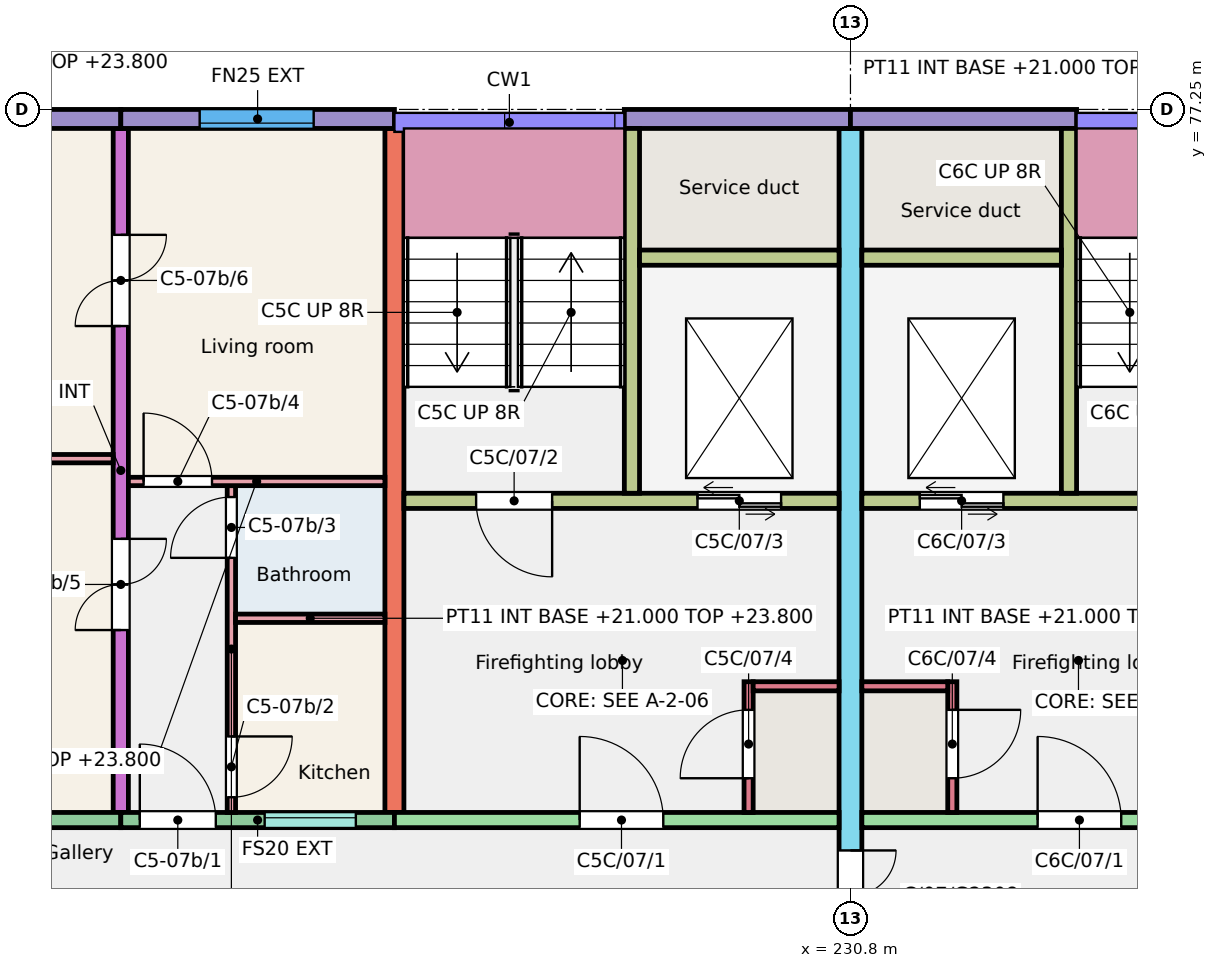
"""IFC4 building model, lengths in metres.
Left out: names, types, materials, properties, quantities, classifications, styles, units other than length and angle.
Written with IfcOpenShell. Run it as: python <this file> out.ifc"""

import sys

from ifc_helpers import new_model, si_unit, direction, frame, frame_2d, origin, place, context, subcontext, project, spatial, rectangle, extrude, element, fill, save


model = new_model("IFC4")
c1 = context("Model", 3, precision=1e-05, world=origin(), true_north=direction((0.0, 1.0)))
c2 = subcontext(c1, "Body", "Model", "MODEL_VIEW")
j1 = project(units=[si_unit("LENGTHUNIT", "METRE"), si_unit("PLANEANGLEUNIT", "RADIAN")], contexts=[c1])
p1 = place(None, origin())
s1 = spatial("IfcSite", under=j1, at=p1, CompositionType="ELEMENT")
p2 = place(p1, origin())
s2 = spatial("IfcBuilding", under=s1, at=p2, CompositionType="ELEMENT")
p3 = place(p2, frame((0.0, 0.0, 21.0)))
s3 = spatial("IfcBuildingStorey", under=s2, at=p3, CompositionType="ELEMENT", Elevation=21.0)
p4 = place(p3, frame((221.2, 68.0, 0.0), z_axis=(0.0, 0.0, 1.0), x_axis=(0.0, 1.0, 0.0)))
e1 = element("IfcWall", 1, at=p4, inside=s3, PredefinedType="SHEAR", context=c2, shape_type="SweptSolid", body=[
    extrude(rectangle(XDim=9.0, YDim=0.2, at=frame_2d((4.5, 0.0))), origin(), (0.0, 0.0, 1.0), 3.0),
])
p5 = place(p4, frame((2.4, 0.0, 0.0)))
e2 = element("IfcOpeningElement", 2, at=p5, cuts=e1, PredefinedType="OPENING", context=c2, shape_type="SweptSolid", body=[
    extrude(rectangle(XDim=1.2, YDim=2.1, at=frame_2d((0.6, 1.05))), frame((0.0, 0.11, 0.0), z_axis=(0.0, -1.0, 0.0), x_axis=(1.0, 0.0, 0.0)), (0.0, 0.0, 1.0), 0.22),
])
p6 = place(p4, frame((6.4, 0.0, 0.0)))
e3 = element("IfcOpeningElement", 3, at=p6, cuts=e1, PredefinedType="OPENING", context=c2, shape_type="SweptSolid", body=[
    extrude(rectangle(XDim=1.2, YDim=2.1, at=frame_2d((0.6, 1.05))), frame((0.0, 0.11, 0.0), z_axis=(0.0, -1.0, 0.0), x_axis=(1.0, 0.0, 0.0)), (0.0, 0.0, 1.0), 0.22),
])
p7 = place(p3, frame((224.8, 68.0, 0.0), z_axis=(0.0, 0.0, 1.0), x_axis=(0.0, 1.0, 0.0)))
e4 = element("IfcWall", 4, at=p7, inside=s3, PredefinedType="SHEAR", context=c2, shape_type="SweptSolid", body=[
    extrude(rectangle(XDim=9.0, YDim=0.25, at=frame_2d((4.5, 0.0))), origin(), (0.0, 0.0, 1.0), 3.0),
])
p8 = place(p3, frame((230.8, 66.0, 0.0), z_axis=(0.0, 0.0, 1.0), x_axis=(0.0, 1.0, 0.0)))
e5 = element("IfcWall", 5, at=p8, inside=s3, PredefinedType="SHEAR", context=c2, shape_type="SweptSolid", body=[
    extrude(rectangle(XDim=11.0, YDim=0.3, at=frame_2d((5.5, 0.0))), origin(), (0.0, 0.0, 1.0), 3.0),
])
p9 = place(p8, frame((0.3, 0.0, 0.0)))
e6 = element("IfcOpeningElement", 6, at=p9, cuts=e5, PredefinedType="OPENING", context=c2, shape_type="SweptSolid", body=[
    extrude(rectangle(XDim=1.2, YDim=2.1, at=frame_2d((0.6, 1.05))), frame((0.0, 0.16, 0.0), z_axis=(0.0, -1.0, 0.0), x_axis=(1.0, 0.0, 0.0)), (0.0, 0.0, 1.0), 0.32),
])
p10 = place(p3, frame((217.6, 77.125, 0.0), z_axis=(0.0, 0.0, 1.0), x_axis=(1.0, 0.0, 0.0)))
e7 = element("IfcWall", 7, at=p10, inside=s3, PredefinedType="SOLIDWALL", context=c2, shape_type="SweptSolid", body=[
    extrude(rectangle(XDim=3.6, YDim=0.25, at=frame_2d((1.8, 0.0))), origin(), (0.0, 0.0, 1.0), 3.0),
])
p11 = place(p10, frame((1.05, 0.0, 0.9)))
e8 = element("IfcOpeningElement", 8, at=p11, cuts=e7, PredefinedType="OPENING", context=c2, shape_type="SweptSolid", body=[
    extrude(rectangle(XDim=1.5, YDim=1.5, at=frame_2d((0.75, 0.75))), frame((0.0, 0.135, 0.0), z_axis=(0.0, -1.0, 0.0), x_axis=(1.0, 0.0, 0.0)), (0.0, 0.0, 1.0), 0.27),
])
p12 = place(p3, frame((217.6, 67.9, 0.0), z_axis=(0.0, 0.0, 1.0), x_axis=(1.0, 0.0, 0.0)))
e9 = element("IfcWall", 9, at=p12, inside=s3, PredefinedType="SOLIDWALL", context=c2, shape_type="SweptSolid", body=[
    extrude(rectangle(XDim=3.6, YDim=0.2, at=frame_2d((1.8, 0.0))), origin(), (0.0, 0.0, 1.0), 3.0),
])
p13 = place(p12, frame((1.05, 0.0, 0.9)))
e10 = element("IfcOpeningElement", 10, at=p13, cuts=e9, PredefinedType="OPENING", context=c2, shape_type="SweptSolid", body=[
    extrude(rectangle(XDim=1.5, YDim=1.5, at=frame_2d((0.75, 0.75))), frame((0.0, 0.11, 0.0), z_axis=(0.0, -1.0, 0.0), x_axis=(1.0, 0.0, 0.0)), (0.0, 0.0, 1.0), 0.22),
])
p14 = place(p3, frame((221.2, 77.125, 0.0), z_axis=(0.0, 0.0, 1.0), x_axis=(1.0, 0.0, 0.0)))
e11 = element("IfcWall", 11, at=p14, inside=s3, PredefinedType="SOLIDWALL", context=c2, shape_type="SweptSolid", body=[
    extrude(rectangle(XDim=3.6, YDim=0.25, at=frame_2d((1.8, 0.0))), origin(), (0.0, 0.0, 1.0), 3.0),
])
p15 = place(p14, frame((1.038, 0.0, 0.9)))
e12 = element("IfcOpeningElement", 12, at=p15, cuts=e11, PredefinedType="OPENING", context=c2, shape_type="SweptSolid", body=[
    extrude(rectangle(XDim=1.5, YDim=1.5, at=frame_2d((0.75, 0.75))), frame((0.0, 0.135, 0.0), z_axis=(0.0, -1.0, 0.0), x_axis=(1.0, 0.0, 0.0)), (0.0, 0.0, 1.0), 0.27),
])
p16 = place(p3, frame((221.2, 67.9, 0.0), z_axis=(0.0, 0.0, 1.0), x_axis=(1.0, 0.0, 0.0)))
e13 = element("IfcWall", 13, at=p16, inside=s3, PredefinedType="SOLIDWALL", context=c2, shape_type="SweptSolid", body=[
    extrude(rectangle(XDim=3.6, YDim=0.2, at=frame_2d((1.8, 0.0))), origin(), (0.0, 0.0, 1.0), 3.0),
])
p17 = place(p16, frame((1.893, 0.0, 1.1)))
e14 = element("IfcOpeningElement", 14, at=p17, cuts=e13, PredefinedType="OPENING", context=c2, shape_type="SweptSolid", body=[
    extrude(rectangle(XDim=1.2, YDim=1.3, at=frame_2d((0.6, 0.65))), frame((0.0, 0.11, 0.0), z_axis=(0.0, -1.0, 0.0), x_axis=(1.0, 0.0, 0.0)), (0.0, 0.0, 1.0), 0.22),
])
p18 = place(p16, frame((0.25, 0.0, 0.0)))
e15 = element("IfcOpeningElement", 15, at=p18, cuts=e13, PredefinedType="OPENING", context=c2, shape_type="SweptSolid", body=[
    extrude(rectangle(XDim=1.0, YDim=2.1, at=frame_2d((0.5, 1.05))), frame((0.0, 0.11, 0.0), z_axis=(0.0, -1.0, 0.0), x_axis=(1.0, 0.0, 0.0)), (0.0, 0.0, 1.0), 0.22),
])
p19 = place(p3, frame((227.825, 77.125, 0.0), z_axis=(0.0, 0.0, 1.0), x_axis=(1.0, 0.0, 0.0)))
e16 = element("IfcWall", 16, at=p19, inside=s3, PredefinedType="SOLIDWALL", context=c2, shape_type="SweptSolid", body=[
    extrude(rectangle(XDim=2.975, YDim=0.25, at=frame_2d((1.488, 0.0))), origin(), (0.0, 0.0, 1.0), 3.0),
])
p20 = place(p3, frame((224.8, 67.9, 0.0), z_axis=(0.0, 0.0, 1.0), x_axis=(1.0, 0.0, 0.0)))
e17 = element("IfcWall", 17, at=p20, inside=s3, PredefinedType="SHEAR", context=c2, shape_type="SweptSolid", body=[
    extrude(rectangle(XDim=5.85, YDim=0.2, at=frame_2d((2.925, 0.0))), origin(), (0.0, 0.0, 1.0), 3.0),
])
p21 = place(p20, frame((2.438, 0.0, 0.0)))
e18 = element("IfcOpeningElement", 18, at=p21, cuts=e17, PredefinedType="OPENING", context=c2, shape_type="SweptSolid", body=[
    extrude(rectangle(XDim=1.1, YDim=2.1, at=frame_2d((0.55, 1.05))), frame((0.0, 0.11, 0.0), z_axis=(0.0, -1.0, 0.0), x_axis=(1.0, 0.0, 0.0)), (0.0, 0.0, 1.0), 0.22),
])
p22 = place(p3, frame((224.925, 72.1, 0.0), z_axis=(0.0, 0.0, 1.0), x_axis=(1.0, 0.0, 0.0)))
e19 = element("IfcWall", 19, at=p22, inside=s3, PredefinedType="SHEAR", context=c2, shape_type="SweptSolid", body=[
    extrude(rectangle(XDim=5.725, YDim=0.2, at=frame_2d((2.862, 0.0))), origin(), (0.0, 0.0, 1.0), 3.0),
])
p23 = place(p22, frame((0.95, 0.0, 0.0)))
e20 = element("IfcOpeningElement", 20, at=p23, cuts=e19, PredefinedType="OPENING", context=c2, shape_type="SweptSolid", body=[
    extrude(rectangle(XDim=1.0, YDim=2.1, at=frame_2d((0.5, 1.05))), frame((0.0, 0.11, 0.0), z_axis=(0.0, -1.0, 0.0), x_axis=(1.0, 0.0, 0.0)), (0.0, 0.0, 1.0), 0.22),
])
p24 = place(p22, frame((3.863, 0.0, 0.0)))
e21 = element("IfcOpeningElement", 21, at=p24, cuts=e19, PredefinedType="OPENING", context=c2, shape_type="SweptSolid", body=[
    extrude(rectangle(XDim=1.1, YDim=2.1, at=frame_2d((0.55, 1.05))), frame((0.0, 0.11, 0.0), z_axis=(0.0, -1.0, 0.0), x_axis=(1.0, 0.0, 0.0)), (0.0, 0.0, 1.0), 0.22),
])
p25 = place(p3, frame((227.925, 72.2, 0.0), z_axis=(0.0, 0.0, 1.0), x_axis=(0.0, 1.0, 0.0)))
e22 = element("IfcWall", 22, at=p25, inside=s3, PredefinedType="SHEAR", context=c2, shape_type="SweptSolid", body=[
    extrude(rectangle(XDim=4.8, YDim=0.2, at=frame_2d((2.4, 0.0))), origin(), (0.0, 0.0, 1.0), 3.0),
])
p26 = place(p3, frame((228.025, 75.3, 0.0), z_axis=(0.0, 0.0, 1.0), x_axis=(1.0, 0.0, 0.0)))
e23 = element("IfcWall", 23, at=p26, inside=s3, PredefinedType="SHEAR", context=c2, shape_type="SweptSolid", body=[
    extrude(rectangle(XDim=2.625, YDim=0.2, at=frame_2d((1.312, 0.0))), origin(), (0.0, 0.0, 1.0), 3.0),
])
p27 = place(p3, frame((229.46, 68.0, 0.0), z_axis=(0.0, 0.0, 1.0), x_axis=(0.0, 1.0, 0.0)))
e24 = element("IfcWall", 24, at=p27, inside=s3, PredefinedType="SHEAR", context=c2, shape_type="SweptSolid", body=[
    extrude(rectangle(XDim=1.72, YDim=0.12, at=frame_2d((0.86, 0.0))), origin(), (0.0, 0.0, 1.0), 3.0),
])
p28 = place(p27, frame((0.45, 0.0, 0.0)))
e25 = element("IfcOpeningElement", 25, at=p28, cuts=e24, PredefinedType="OPENING", context=c2, shape_type="SweptSolid", body=[
    extrude(rectangle(XDim=0.9, YDim=2.1, at=frame_2d((0.45, 1.05))), frame((0.0, 0.07, 0.0), z_axis=(0.0, -1.0, 0.0), x_axis=(1.0, 0.0, 0.0)), (0.0, 0.0, 1.0), 0.14),
])
p29 = place(p3, frame((229.52, 69.66, 0.0), z_axis=(0.0, 0.0, 1.0), x_axis=(1.0, 0.0, 0.0)))
e26 = element("IfcWall", 26, at=p29, inside=s3, PredefinedType="SHEAR", context=c2, shape_type="SweptSolid", body=[
    extrude(rectangle(XDim=1.13, YDim=0.12, at=frame_2d((0.565, 0.0))), origin(), (0.0, 0.0, 1.0), 3.0),
])
p30 = place(p3, frame((230.8, 77.125, 0.0), z_axis=(0.0, 0.0, 1.0), x_axis=(1.0, 0.0, 0.0)))
e27 = element("IfcWall", 27, at=p30, inside=s3, PredefinedType="SOLIDWALL", context=c2, shape_type="SweptSolid", body=[
    extrude(rectangle(XDim=2.975, YDim=0.25, at=frame_2d((1.487, 0.0))), origin(), (0.0, 0.0, 1.0), 3.0),
])
p31 = place(p3, frame((230.95, 67.9, 0.0), z_axis=(0.0, 0.0, 1.0), x_axis=(1.0, 0.0, 0.0)))
e28 = element("IfcWall", 28, at=p31, inside=s3, PredefinedType="SHEAR", context=c2, shape_type="SweptSolid", body=[
    extrude(rectangle(XDim=5.85, YDim=0.2, at=frame_2d((2.925, 0.0))), origin(), (0.0, 0.0, 1.0), 3.0),
])
p32 = place(p31, frame((2.312, 0.0, 0.0)))
e29 = element("IfcOpeningElement", 29, at=p32, cuts=e28, PredefinedType="OPENING", context=c2, shape_type="SweptSolid", body=[
    extrude(rectangle(XDim=1.1, YDim=2.1, at=frame_2d((0.55, 1.05))), frame((0.0, 0.11, 0.0), z_axis=(0.0, -1.0, 0.0), x_axis=(1.0, 0.0, 0.0)), (0.0, 0.0, 1.0), 0.22),
])
p33 = place(p3, frame((230.95, 72.1, 0.0), z_axis=(0.0, 0.0, 1.0), x_axis=(1.0, 0.0, 0.0)))
e30 = element("IfcWall", 30, at=p33, inside=s3, PredefinedType="SHEAR", context=c2, shape_type="SweptSolid", body=[
    extrude(rectangle(XDim=5.725, YDim=0.2, at=frame_2d((2.863, 0.0))), origin(), (0.0, 0.0, 1.0), 3.0),
])
p34 = place(p33, frame((3.775, 0.0, 0.0)))
e31 = element("IfcOpeningElement", 31, at=p34, cuts=e30, PredefinedType="OPENING", context=c2, shape_type="SweptSolid", body=[
    extrude(rectangle(XDim=1.0, YDim=2.1, at=frame_2d((0.5, 1.05))), frame((0.0, 0.11, 0.0), z_axis=(0.0, -1.0, 0.0), x_axis=(1.0, 0.0, 0.0)), (0.0, 0.0, 1.0), 0.22),
])
p35 = place(p33, frame((0.762, 0.0, 0.0)))
e32 = element("IfcOpeningElement", 32, at=p35, cuts=e30, PredefinedType="OPENING", context=c2, shape_type="SweptSolid", body=[
    extrude(rectangle(XDim=1.1, YDim=2.1, at=frame_2d((0.55, 1.05))), frame((0.0, 0.11, 0.0), z_axis=(0.0, -1.0, 0.0), x_axis=(1.0, 0.0, 0.0)), (0.0, 0.0, 1.0), 0.22),
])
p36 = place(p3, frame((233.675, 72.2, 0.0), z_axis=(0.0, 0.0, 1.0), x_axis=(0.0, 1.0, 0.0)))
e33 = element("IfcWall", 33, at=p36, inside=s3, PredefinedType="SHEAR", context=c2, shape_type="SweptSolid", body=[
    extrude(rectangle(XDim=4.8, YDim=0.2, at=frame_2d((2.4, 0.0))), origin(), (0.0, 0.0, 1.0), 3.0),
])
p37 = place(p3, frame((230.95, 75.3, 0.0), z_axis=(0.0, 0.0, 1.0), x_axis=(1.0, 0.0, 0.0)))
e34 = element("IfcWall", 34, at=p37, inside=s3, PredefinedType="SHEAR", context=c2, shape_type="SweptSolid", body=[
    extrude(rectangle(XDim=2.625, YDim=0.2, at=frame_2d((1.312, 0.0))), origin(), (0.0, 0.0, 1.0), 3.0),
])
p38 = place(p3, frame((232.14, 68.0, 0.0), z_axis=(0.0, 0.0, 1.0), x_axis=(0.0, 1.0, 0.0)))
e35 = element("IfcWall", 35, at=p38, inside=s3, PredefinedType="SHEAR", context=c2, shape_type="SweptSolid", body=[
    extrude(rectangle(XDim=1.72, YDim=0.12, at=frame_2d((0.86, 0.0))), origin(), (0.0, 0.0, 1.0), 3.0),
])
p39 = place(p38, frame((0.45, 0.0, 0.0)))
e36 = element("IfcOpeningElement", 36, at=p39, cuts=e35, PredefinedType="OPENING", context=c2, shape_type="SweptSolid", body=[
    extrude(rectangle(XDim=0.9, YDim=2.1, at=frame_2d((0.45, 1.05))), frame((0.0, 0.07, 0.0), z_axis=(0.0, -1.0, 0.0), x_axis=(1.0, 0.0, 0.0)), (0.0, 0.0, 1.0), 0.14),
])
p40 = place(p3, frame((230.95, 69.66, 0.0), z_axis=(0.0, 0.0, 1.0), x_axis=(1.0, 0.0, 0.0)))
e37 = element("IfcWall", 37, at=p40, inside=s3, PredefinedType="SHEAR", context=c2, shape_type="SweptSolid", body=[
    extrude(rectangle(XDim=1.13, YDim=0.12, at=frame_2d((0.565, 0.0))), origin(), (0.0, 0.0, 1.0), 3.0),
])
p41 = place(p3, frame((222.655, 68.0, 0.0), z_axis=(0.0, 0.0, 1.0), x_axis=(0.0, 1.0, 0.0)))
e38 = element("IfcWall", 38, at=p41, inside=s3, PredefinedType="PARTITIONING", context=c2, shape_type="SweptSolid", body=[
    extrude(rectangle(XDim=4.3, YDim=0.11, at=frame_2d((2.15, 0.0))), origin(), (0.0, 0.0, 1.0), 2.8),
])
p42 = place(p41, frame((0.2, 0.0, 0.0)))
e39 = element("IfcOpeningElement", 39, at=p42, cuts=e38, PredefinedType="OPENING", context=c2, shape_type="SweptSolid", body=[
    extrude(rectangle(XDim=0.8, YDim=2.1, at=frame_2d((0.4, 1.05))), frame((0.0, 0.065, 0.0), z_axis=(0.0, -1.0, 0.0), x_axis=(1.0, 0.0, 0.0)), (0.0, 0.0, 1.0), 0.13),
])
p43 = place(p41, frame((3.35, 0.0, 0.0)))
e40 = element("IfcOpeningElement", 40, at=p43, cuts=e38, PredefinedType="OPENING", context=c2, shape_type="SweptSolid", body=[
    extrude(rectangle(XDim=0.8, YDim=2.1, at=frame_2d((0.4, 1.05))), frame((0.0, 0.065, 0.0), z_axis=(0.0, -1.0, 0.0), x_axis=(1.0, 0.0, 0.0)), (0.0, 0.0, 1.0), 0.13),
])
p44 = place(p3, frame((222.71, 70.555, 0.0), z_axis=(0.0, 0.0, 1.0), x_axis=(1.0, 0.0, 0.0)))
e41 = element("IfcWall", 41, at=p44, inside=s3, PredefinedType="PARTITIONING", context=c2, shape_type="SweptSolid", body=[
    extrude(rectangle(XDim=1.965, YDim=0.11, at=frame_2d((0.982, 0.0))), origin(), (0.0, 0.0, 1.0), 2.8),
])
p45 = place(p3, frame((221.3, 72.355, 0.0), z_axis=(0.0, 0.0, 1.0), x_axis=(1.0, 0.0, 0.0)))
e42 = element("IfcWall", 42, at=p45, inside=s3, PredefinedType="PARTITIONING", context=c2, shape_type="SweptSolid", body=[
    extrude(rectangle(XDim=3.375, YDim=0.11, at=frame_2d((1.688, 0.0))), origin(), (0.0, 0.0, 1.0), 2.8),
])
p46 = place(p45, frame((0.2, 0.0, 0.0)))
e43 = element("IfcOpeningElement", 43, at=p46, cuts=e42, PredefinedType="OPENING", context=c2, shape_type="SweptSolid", body=[
    extrude(rectangle(XDim=0.9, YDim=2.1, at=frame_2d((0.45, 1.05))), frame((0.0, 0.065, 0.0), z_axis=(0.0, -1.0, 0.0), x_axis=(1.0, 0.0, 0.0)), (0.0, 0.0, 1.0), 0.13),
])
p47 = place(p3, frame((217.7, 72.655, 0.0), z_axis=(0.0, 0.0, 1.0), x_axis=(1.0, 0.0, 0.0)))
e44 = element("IfcWall", 44, at=p47, inside=s3, PredefinedType="PARTITIONING", context=c2, shape_type="SweptSolid", body=[
    extrude(rectangle(XDim=3.4, YDim=0.11, at=frame_2d((1.7, 0.0))), origin(), (0.0, 0.0, 1.0), 2.8),
])
p48 = place(p17, origin())
e45 = element("IfcWindow", 45, at=p48, inside=s3, PartitioningType="SINGLE_PANEL", PredefinedType="WINDOW", context=c2, shape_type="SweptSolid", body=[
    extrude(rectangle(XDim=1.2, YDim=1.3, at=frame_2d((0.6, 0.65))), frame((0.0, 0.06, 0.0), z_axis=(0.0, -1.0, 0.0), x_axis=(1.0, 0.0, 0.0)), (0.0, 0.0, 1.0), 0.06),
])
fill(e14, e45)
p49 = place(p15, origin())
e46 = element("IfcWindow", 46, at=p49, inside=s3, PartitioningType="SINGLE_PANEL", PredefinedType="WINDOW", context=c2, shape_type="SweptSolid", body=[
    extrude(rectangle(XDim=1.5, YDim=1.5, at=frame_2d((0.75, 0.75))), frame((0.0, -0.025, 0.0), z_axis=(0.0, -1.0, 0.0), x_axis=(1.0, 0.0, 0.0)), (0.0, 0.0, 1.0), 0.06),
])
fill(e12, e46)
p50 = place(p18, origin())
e47 = element("IfcDoor", 47, at=p50, inside=s3, OperationType="SINGLE_SWING_LEFT", PredefinedType="DOOR", context=c2, shape_type="SweptSolid", body=[
    extrude(rectangle(XDim=1.0, YDim=2.1, at=frame_2d((0.5, 1.05))), frame((0.0, 0.025, 0.0), z_axis=(0.0, -1.0, 0.0), x_axis=(1.0, 0.0, 0.0)), (0.0, 0.0, 1.0), 0.05),
])
fill(e15, e47)
p51 = place(p42, origin())
e48 = element("IfcDoor", 48, at=p51, inside=s3, OperationType="SINGLE_SWING_RIGHT", PredefinedType="DOOR", context=c2, shape_type="SweptSolid", body=[
    extrude(rectangle(XDim=0.8, YDim=2.1, at=frame_2d((0.4, 1.05))), frame((0.0, 0.025, 0.0), z_axis=(0.0, -1.0, 0.0), x_axis=(1.0, 0.0, 0.0)), (0.0, 0.0, 1.0), 0.05),
])
fill(e39, e48)
p52 = place(p43, origin())
e49 = element("IfcDoor", 49, at=p52, inside=s3, OperationType="SINGLE_SWING_LEFT", PredefinedType="DOOR", context=c2, shape_type="SweptSolid", body=[
    extrude(rectangle(XDim=0.8, YDim=2.1, at=frame_2d((0.4, 1.05))), frame((0.0, 0.025, 0.0), z_axis=(0.0, -1.0, 0.0), x_axis=(1.0, 0.0, 0.0)), (0.0, 0.0, 1.0), 0.05),
])
fill(e40, e49)
p53 = place(p46, origin())
e50 = element("IfcDoor", 50, at=p53, inside=s3, OperationType="SINGLE_SWING_LEFT", PredefinedType="DOOR", context=c2, shape_type="SweptSolid", body=[
    extrude(rectangle(XDim=0.9, YDim=2.1, at=frame_2d((0.45, 1.05))), frame((0.0, 0.025, 0.0), z_axis=(0.0, -1.0, 0.0), x_axis=(1.0, 0.0, 0.0)), (0.0, 0.0, 1.0), 0.05),
])
fill(e43, e50)
p54 = place(p5, origin())
e51 = element("IfcDoor", 51, at=p54, inside=s3, OperationType="DOUBLE_DOOR_SINGLE_SWING", PredefinedType="DOOR", context=c2, shape_type="SweptSolid", body=[
    extrude(rectangle(XDim=1.2, YDim=2.1, at=frame_2d((0.6, 1.05))), frame((0.0, 0.025, 0.0), z_axis=(0.0, -1.0, 0.0), x_axis=(1.0, 0.0, 0.0)), (0.0, 0.0, 1.0), 0.05),
])
fill(e2, e51)
p55 = place(p6, origin())
e52 = element("IfcDoor", 52, at=p55, inside=s3, OperationType="DOUBLE_DOOR_SINGLE_SWING", PredefinedType="DOOR", context=c2, shape_type="SweptSolid", body=[
    extrude(rectangle(XDim=1.2, YDim=2.1, at=frame_2d((0.6, 1.05))), frame((0.0, 0.025, 0.0), z_axis=(0.0, -1.0, 0.0), x_axis=(1.0, 0.0, 0.0)), (0.0, 0.0, 1.0), 0.05),
])
fill(e3, e52)
p56 = place(p21, origin())
e53 = element("IfcDoor", 53, at=p56, inside=s3, OperationType="SINGLE_SWING_LEFT", PredefinedType="DOOR", context=c2, shape_type="SweptSolid", body=[
    extrude(rectangle(XDim=1.1, YDim=2.1, at=frame_2d((0.55, 1.05))), frame((0.0, 0.025, 0.0), z_axis=(0.0, -1.0, 0.0), x_axis=(1.0, 0.0, 0.0)), (0.0, 0.0, 1.0), 0.05),
])
fill(e18, e53)
p57 = place(p23, origin())
e54 = element("IfcDoor", 54, at=p57, inside=s3, OperationType="SINGLE_SWING_RIGHT", PredefinedType="DOOR", context=c2, shape_type="SweptSolid", body=[
    extrude(rectangle(XDim=1.0, YDim=2.1, at=frame_2d((0.5, 1.05))), frame((0.0, 0.025, 0.0), z_axis=(0.0, -1.0, 0.0), x_axis=(1.0, 0.0, 0.0)), (0.0, 0.0, 1.0), 0.05),
])
fill(e20, e54)
p58 = place(p24, origin())
e55 = element("IfcDoor", 55, at=p58, inside=s3, OperationType="DOUBLE_DOOR_SLIDING", PredefinedType="DOOR", context=c2, shape_type="SweptSolid", body=[
    extrude(rectangle(XDim=1.1, YDim=2.1, at=frame_2d((0.55, 1.05))), frame((0.0, 0.025, 0.0), z_axis=(0.0, -1.0, 0.0), x_axis=(1.0, 0.0, 0.0)), (0.0, 0.0, 1.0), 0.05),
])
fill(e21, e55)
p59 = place(p28, origin())
e56 = element("IfcDoor", 56, at=p59, inside=s3, OperationType="SINGLE_SWING_LEFT", PredefinedType="DOOR", context=c2, shape_type="SweptSolid", body=[
    extrude(rectangle(XDim=0.9, YDim=2.1, at=frame_2d((0.45, 1.05))), frame((0.0, 0.025, 0.0), z_axis=(0.0, -1.0, 0.0), x_axis=(1.0, 0.0, 0.0)), (0.0, 0.0, 1.0), 0.05),
])
fill(e25, e56)
p60 = place(p32, origin())
e57 = element("IfcDoor", 57, at=p60, inside=s3, OperationType="SINGLE_SWING_LEFT", PredefinedType="DOOR", context=c2, shape_type="SweptSolid", body=[
    extrude(rectangle(XDim=1.1, YDim=2.1, at=frame_2d((0.55, 1.05))), frame((0.0, 0.025, 0.0), z_axis=(0.0, -1.0, 0.0), x_axis=(1.0, 0.0, 0.0)), (0.0, 0.0, 1.0), 0.05),
])
fill(e29, e57)
p61 = place(p35, origin())
e58 = element("IfcDoor", 58, at=p61, inside=s3, OperationType="DOUBLE_DOOR_SLIDING", PredefinedType="DOOR", context=c2, shape_type="SweptSolid", body=[
    extrude(rectangle(XDim=1.1, YDim=2.1, at=frame_2d((0.55, 1.05))), frame((0.0, 0.025, 0.0), z_axis=(0.0, -1.0, 0.0), x_axis=(1.0, 0.0, 0.0)), (0.0, 0.0, 1.0), 0.05),
])
fill(e32, e58)
p62 = place(p39, origin())
e59 = element("IfcDoor", 59, at=p62, inside=s3, OperationType="SINGLE_SWING_RIGHT", PredefinedType="DOOR", context=c2, shape_type="SweptSolid", body=[
    extrude(rectangle(XDim=0.9, YDim=2.1, at=frame_2d((0.45, 1.05))), frame((0.0, 0.025, 0.0), z_axis=(0.0, -1.0, 0.0), x_axis=(1.0, 0.0, 0.0)), (0.0, 0.0, 1.0), 0.05),
])
fill(e36, e59)
p63 = place(p9, origin())
e60 = element("IfcDoor", 60, at=p63, inside=s3, OperationType="DOUBLE_DOOR_SINGLE_SWING", PredefinedType="DOOR", context=c2, shape_type="SweptSolid", body=[
    extrude(rectangle(XDim=1.2, YDim=2.1, at=frame_2d((0.6, 1.05))), frame((0.0, 0.025, 0.0), z_axis=(0.0, -1.0, 0.0), x_axis=(1.0, 0.0, 0.0)), (0.0, 0.0, 1.0), 0.05),
])
fill(e6, e60)
save(model, sys.argv[1])
